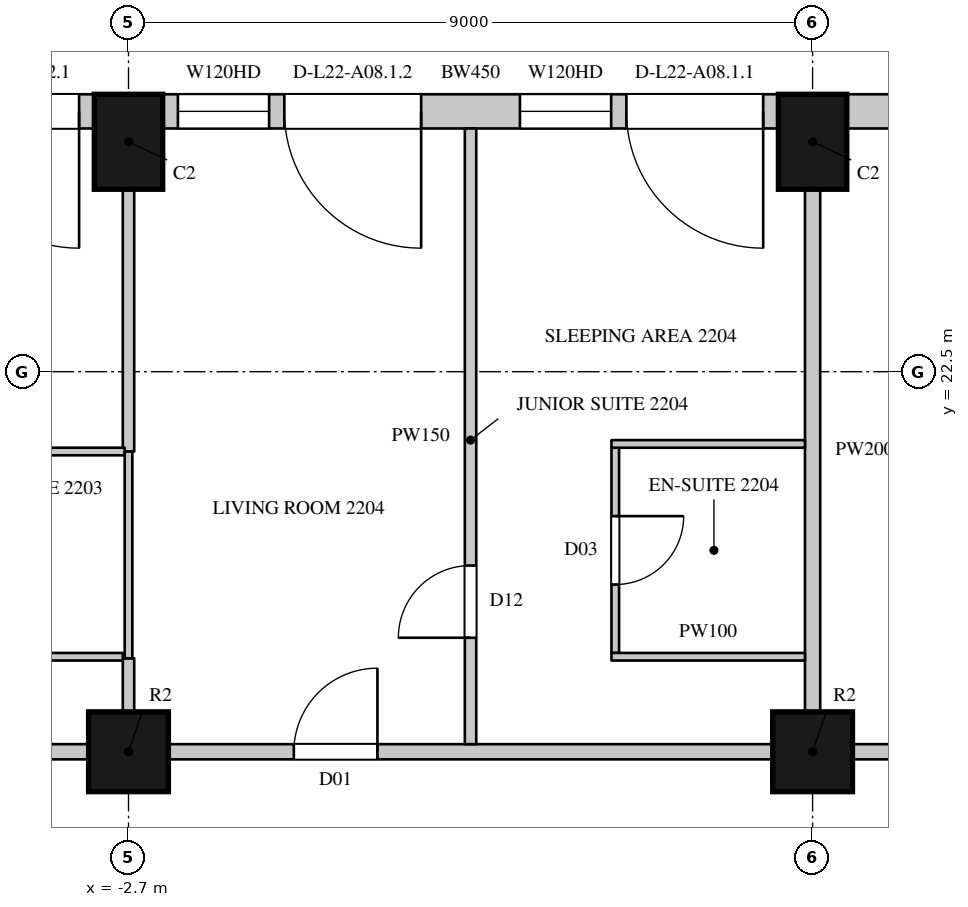
"""IFC4 building model, lengths in metres.
Left out: names, types, materials, properties, quantities, classifications, styles, units other than length and angle.
Written with IfcOpenShell. Run it as: python <this file> out.ifc"""

import sys

from ifc_helpers import new_model, si_unit, direction, frame, frame_2d, origin, origin_2d, place, context, subcontext, project, spatial, rectangle, circle, extrude, element, fill, save


model = new_model("IFC4")
c1 = context("Model", 3, precision=1e-05, world=origin(), true_north=direction((0.0, 1.0)))
c2 = subcontext(c1, "Body", "Model", "MODEL_VIEW")
j1 = project(units=[si_unit("LENGTHUNIT", "METRE"), si_unit("PLANEANGLEUNIT", "RADIAN")], contexts=[c1])
p1 = place(None, origin())
s1 = spatial("IfcSite", under=j1, at=p1, CompositionType="ELEMENT")
p2 = place(p1, origin())
s2 = spatial("IfcBuilding", under=s1, at=p2, CompositionType="ELEMENT")
p3 = place(p2, frame((0.0, 0.0, 109.5)))
s3 = spatial("IfcBuildingStorey", under=s2, at=p3, CompositionType="ELEMENT", Elevation=109.5)
for number, where, z_axis, x_axis in (
    (1, (6.3, 25.525, 0.0), (0.0, 0.0, 1.0), (-1.0, 0.0, 0.0)),
    (2, (-2.7, 25.525, 0.0), (0.0, 0.0, 1.0), (-1.0, 0.0, 0.0)),
):
    element("IfcColumn", number, at=place(p3, frame(where, z_axis=z_axis, x_axis=x_axis)), inside=s3, PredefinedType="COLUMN", context=c2, shape_type="SweptSolid", body=[
        extrude(rectangle(XDim=0.9, YDim=1.25, at=origin_2d()), origin(), (0.0, 0.0, 1.0), 3.6),
    ])
for number, where, z_axis, x_axis in (
    (3, (-2.7, 17.5, 0.0), (0.0, 0.0, 1.0), (1.0, 0.0, 0.0)),
    (4, (6.3, 17.5, 0.0), (0.0, 0.0, 1.0), (1.0, 0.0, 0.0)),
):
    element("IfcColumn", number, at=place(p3, frame(where, z_axis=z_axis, x_axis=x_axis)), inside=s3, PredefinedType="COLUMN", context=c2, shape_type="SweptSolid", body=[
        extrude(circle(Radius=0.525, at=origin_2d()), origin(), (0.0, 0.0, 1.0), 3.6),
    ])
p4 = place(p3, frame((11.989, 25.925, 0.0), z_axis=(0.0, 0.0, 1.0), x_axis=(-1.0, 0.0, 0.0)))
e5 = element("IfcWall", 5, at=p4, inside=s3, PredefinedType="SOLIDWALL", context=c2, shape_type="SweptSolid", body=[
    extrude(rectangle(XDim=5.239, YDim=0.45, at=frame_2d((2.619, 0.0))), origin(), (0.0, 0.0, 1.0), 3.3),
])
p5 = place(p4, frame((1.77, 0.0, 1.05)))
e6 = element("IfcOpeningElement", 6, at=p5, cuts=e5, PredefinedType="OPENING", context=c2, shape_type="SweptSolid", body=[
    extrude(rectangle(XDim=2.1, YDim=2.0, at=frame_2d((1.05, 1.0))), frame((0.0, 0.235, 0.0), z_axis=(0.0, -1.0, 0.0), x_axis=(1.0, 0.0, 0.0)), (0.0, 0.0, 1.0), 0.47),
])
p6 = place(p3, frame((5.85, 25.925, 0.0), z_axis=(0.0, 0.0, 1.0), x_axis=(-1.0, 0.0, 0.0)))
e7 = element("IfcWall", 7, at=p6, inside=s3, PredefinedType="SOLIDWALL", context=c2, shape_type="SweptSolid", body=[
    extrude(rectangle(XDim=8.1, YDim=0.45, at=frame_2d((4.05, 0.0))), origin(), (0.0, 0.0, 1.0), 3.3),
])
p7 = place(p6, frame((0.2, 0.0, 0.0)))
e8 = element("IfcOpeningElement", 8, at=p7, cuts=e7, PredefinedType="OPENING", context=c2, shape_type="SweptSolid", body=[
    extrude(rectangle(XDim=1.8, YDim=2.4, at=frame_2d((0.9, 1.2))), frame((0.0, 0.235, 0.0), z_axis=(0.0, -1.0, 0.0), x_axis=(1.0, 0.0, 0.0)), (0.0, 0.0, 1.0), 0.47),
])
p8 = place(p6, frame((2.2, 0.0, 1.05)))
e9 = element("IfcOpeningElement", 9, at=p8, cuts=e7, PredefinedType="OPENING", context=c2, shape_type="SweptSolid", body=[
    extrude(rectangle(XDim=1.2, YDim=2.0, at=frame_2d((0.6, 1.0))), frame((0.0, 0.235, 0.0), z_axis=(0.0, -1.0, 0.0), x_axis=(1.0, 0.0, 0.0)), (0.0, 0.0, 1.0), 0.47),
])
p9 = place(p6, frame((4.7, 0.0, 0.0)))
e10 = element("IfcOpeningElement", 10, at=p9, cuts=e7, PredefinedType="OPENING", context=c2, shape_type="SweptSolid", body=[
    extrude(rectangle(XDim=1.8, YDim=2.4, at=frame_2d((0.9, 1.2))), frame((0.0, 0.235, 0.0), z_axis=(0.0, -1.0, 0.0), x_axis=(1.0, 0.0, 0.0)), (0.0, 0.0, 1.0), 0.47),
])
p10 = place(p6, frame((6.7, 0.0, 1.05)))
e11 = element("IfcOpeningElement", 11, at=p10, cuts=e7, PredefinedType="OPENING", context=c2, shape_type="SweptSolid", body=[
    extrude(rectangle(XDim=1.2, YDim=2.0, at=frame_2d((0.6, 1.0))), frame((0.0, 0.235, 0.0), z_axis=(0.0, -1.0, 0.0), x_axis=(1.0, 0.0, 0.0)), (0.0, 0.0, 1.0), 0.47),
])
p11 = place(p3, frame((-3.15, 25.925, 0.0), z_axis=(0.0, 0.0, 1.0), x_axis=(-1.0, 0.0, 0.0)))
e12 = element("IfcWall", 12, at=p11, inside=s3, PredefinedType="SOLIDWALL", context=c2, shape_type="SweptSolid", body=[
    extrude(rectangle(XDim=8.1, YDim=0.45, at=frame_2d((4.05, 0.0))), origin(), (0.0, 0.0, 1.0), 3.3),
])
p12 = place(p11, frame((0.2, 0.0, 0.0)))
e13 = element("IfcOpeningElement", 13, at=p12, cuts=e12, PredefinedType="OPENING", context=c2, shape_type="SweptSolid", body=[
    extrude(rectangle(XDim=1.8, YDim=2.4, at=frame_2d((0.9, 1.2))), frame((0.0, 0.235, 0.0), z_axis=(0.0, -1.0, 0.0), x_axis=(1.0, 0.0, 0.0)), (0.0, 0.0, 1.0), 0.47),
])
p13 = place(p11, frame((2.2, 0.0, 1.05)))
e14 = element("IfcOpeningElement", 14, at=p13, cuts=e12, PredefinedType="OPENING", context=c2, shape_type="SweptSolid", body=[
    extrude(rectangle(XDim=1.2, YDim=2.0, at=frame_2d((0.6, 1.0))), frame((0.0, 0.235, 0.0), z_axis=(0.0, -1.0, 0.0), x_axis=(1.0, 0.0, 0.0)), (0.0, 0.0, 1.0), 0.47),
])
p14 = place(p11, frame((4.7, 0.0, 0.0)))
e15 = element("IfcOpeningElement", 15, at=p14, cuts=e12, PredefinedType="OPENING", context=c2, shape_type="SweptSolid", body=[
    extrude(rectangle(XDim=1.8, YDim=2.4, at=frame_2d((0.9, 1.2))), frame((0.0, 0.235, 0.0), z_axis=(0.0, -1.0, 0.0), x_axis=(1.0, 0.0, 0.0)), (0.0, 0.0, 1.0), 0.47),
])
p15 = place(p11, frame((6.7, 0.0, 1.05)))
e16 = element("IfcOpeningElement", 16, at=p15, cuts=e12, PredefinedType="OPENING", context=c2, shape_type="SweptSolid", body=[
    extrude(rectangle(XDim=1.2, YDim=2.0, at=frame_2d((0.6, 1.0))), frame((0.0, 0.235, 0.0), z_axis=(0.0, -1.0, 0.0), x_axis=(1.0, 0.0, 0.0)), (0.0, 0.0, 1.0), 0.47),
])
p16 = place(p3, frame((-11.175, 17.5, 0.0), z_axis=(0.0, 0.0, 1.0), x_axis=(1.0, 0.0, 0.0)))
e17 = element("IfcWall", 17, at=p16, inside=s3, PredefinedType="PARTITIONING", context=c2, shape_type="SweptSolid", body=[
    extrude(rectangle(XDim=7.95, YDim=0.2, at=frame_2d((3.975, 0.0))), origin(), (0.0, 0.0, 1.0), 2.75),
])
p17 = place(p16, frame((4.55, 0.0, 0.0)))
e18 = element("IfcOpeningElement", 18, at=p17, cuts=e17, PredefinedType="OPENING", context=c2, shape_type="SweptSolid", body=[
    extrude(rectangle(XDim=0.95, YDim=2.2, at=frame_2d((0.475, 1.1))), frame((0.0, 0.11, 0.0), z_axis=(0.0, -1.0, 0.0), x_axis=(1.0, 0.0, 0.0)), (0.0, 0.0, 1.0), 0.22),
])
p18 = place(p3, frame((-2.175, 17.5, 0.0), z_axis=(0.0, 0.0, 1.0), x_axis=(1.0, 0.0, 0.0)))
e19 = element("IfcWall", 19, at=p18, inside=s3, PredefinedType="PARTITIONING", context=c2, shape_type="SweptSolid", body=[
    extrude(rectangle(XDim=7.95, YDim=0.2, at=frame_2d((3.975, 0.0))), origin(), (0.0, 0.0, 1.0), 2.75),
])
p19 = place(p18, frame((1.65, 0.0, 0.0)))
e20 = element("IfcOpeningElement", 20, at=p19, cuts=e19, PredefinedType="OPENING", context=c2, shape_type="SweptSolid", body=[
    extrude(rectangle(XDim=1.1, YDim=2.4, at=frame_2d((0.55, 1.2))), frame((0.0, 0.11, 0.0), z_axis=(0.0, -1.0, 0.0), x_axis=(1.0, 0.0, 0.0)), (0.0, 0.0, 1.0), 0.22),
])
p20 = place(p3, frame((6.825, 17.5, 0.0), z_axis=(0.0, 0.0, 1.0), x_axis=(1.0, 0.0, 0.0)))
e21 = element("IfcWall", 21, at=p20, inside=s3, PredefinedType="PARTITIONING", context=c2, shape_type="SweptSolid", body=[
    extrude(rectangle(XDim=7.95, YDim=0.2, at=frame_2d((3.975, 0.0))), origin(), (0.0, 0.0, 1.0), 2.75),
])
p21 = place(p20, frame((1.55, 0.0, 0.0)))
e22 = element("IfcOpeningElement", 22, at=p21, cuts=e21, PredefinedType="OPENING", context=c2, shape_type="SweptSolid", body=[
    extrude(rectangle(XDim=1.1, YDim=2.4, at=frame_2d((0.55, 1.2))), frame((0.0, 0.11, 0.0), z_axis=(0.0, -1.0, 0.0), x_axis=(1.0, 0.0, 0.0)), (0.0, 0.0, 1.0), 0.22),
])
p22 = place(p3, frame((-2.7, 18.025, 0.0), z_axis=(0.0, 0.0, 1.0), x_axis=(0.0, 1.0, 0.0)))
e23 = element("IfcWall", 23, at=p22, inside=s3, PredefinedType="PARTITIONING", context=c2, shape_type="SweptSolid", body=[
    extrude(rectangle(XDim=0.705, YDim=0.15, at=frame_2d((0.353, 0.0))), origin(), (0.0, 0.0, 1.0), 2.75),
])
p23 = place(p3, frame((-2.7, 21.45, 0.0), z_axis=(0.0, 0.0, 1.0), x_axis=(0.0, 1.0, 0.0)))
e24 = element("IfcWall", 24, at=p23, inside=s3, PredefinedType="PARTITIONING", context=c2, shape_type="SweptSolid", body=[
    extrude(rectangle(XDim=3.45, YDim=0.15, at=frame_2d((1.725, 0.0))), origin(), (0.0, 0.0, 1.0), 2.75),
])
p24 = place(p3, frame((1.8, 17.6, 0.0), z_axis=(0.0, 0.0, 1.0), x_axis=(0.0, 1.0, 0.0)))
e25 = element("IfcWall", 25, at=p24, inside=s3, PredefinedType="PARTITIONING", context=c2, shape_type="SweptSolid", body=[
    extrude(rectangle(XDim=8.1, YDim=0.15, at=frame_2d((4.05, 0.0))), origin(), (0.0, 0.0, 1.0), 2.65),
])
p25 = place(p24, frame((1.4, 0.0, 0.0)))
e26 = element("IfcOpeningElement", 26, at=p25, cuts=e25, PredefinedType="OPENING", context=c2, shape_type="SweptSolid", body=[
    extrude(rectangle(XDim=0.95, YDim=2.2, at=frame_2d((0.475, 1.1))), frame((0.0, 0.085, 0.0), z_axis=(0.0, -1.0, 0.0), x_axis=(1.0, 0.0, 0.0)), (0.0, 0.0, 1.0), 0.17),
])
p26 = place(p3, frame((6.3, 18.025, 0.0), z_axis=(0.0, 0.0, 1.0), x_axis=(0.0, 1.0, 0.0)))
e27 = element("IfcWall", 27, at=p26, inside=s3, PredefinedType="PARTITIONING", context=c2, shape_type="SweptSolid", body=[
    extrude(rectangle(XDim=6.875, YDim=0.2, at=frame_2d((3.438, 0.0))), origin(), (0.0, 0.0, 1.0), 2.75),
])
p27 = place(p3, frame((-5.146, 18.75, 0.0), z_axis=(0.0, 0.0, 1.0), x_axis=(1.0, 0.0, 0.0)))
e28 = element("IfcWall", 28, at=p27, inside=s3, PredefinedType="PARTITIONING", context=c2, shape_type="SweptSolid", body=[
    extrude(rectangle(XDim=2.371, YDim=0.1, at=frame_2d((1.186, 0.0))), origin(), (0.0, 0.0, 1.0), 3.3),
])
p28 = place(p3, frame((-5.146, 21.45, 0.0), z_axis=(0.0, 0.0, 1.0), x_axis=(1.0, 0.0, 0.0)))
e29 = element("IfcWall", 29, at=p28, inside=s3, PredefinedType="PARTITIONING", context=c2, shape_type="SweptSolid", body=[
    extrude(rectangle(XDim=2.396, YDim=0.1, at=frame_2d((1.198, 0.0))), origin(), (0.0, 0.0, 1.0), 3.3),
])
p29 = place(p3, frame((-2.7, 18.73, 0.0), z_axis=(0.0, 0.0, 1.0), x_axis=(0.0, 1.0, 0.0)))
e30 = element("IfcWall", 30, at=p29, inside=s3, PredefinedType="PARTITIONING", context=c2, shape_type="SweptSolid", body=[
    extrude(rectangle(XDim=2.72, YDim=0.1, at=frame_2d((1.36, 0.0))), origin(), (0.0, 0.0, 1.0), 2.75),
])
p30 = place(p3, frame((3.704, 18.8, 0.0), z_axis=(0.0, 0.0, 1.0), x_axis=(0.0, 1.0, 0.0)))
e31 = element("IfcWall", 31, at=p30, inside=s3, PredefinedType="PARTITIONING", context=c2, shape_type="SweptSolid", body=[
    extrude(rectangle(XDim=2.7, YDim=0.1, at=frame_2d((1.35, 0.0))), origin(), (0.0, 0.0, 1.0), 3.3),
])
p31 = place(p30, frame((0.9, 0.0, 0.0)))
e32 = element("IfcOpeningElement", 32, at=p31, cuts=e31, PredefinedType="OPENING", context=c2, shape_type="SweptSolid", body=[
    extrude(rectangle(XDim=0.9, YDim=2.2, at=frame_2d((0.45, 1.1))), frame((0.0, 0.06, 0.0), z_axis=(0.0, -1.0, 0.0), x_axis=(1.0, 0.0, 0.0)), (0.0, 0.0, 1.0), 0.12),
])
for number, where, z_axis, x_axis in (
    (33, (3.654, 18.75, 0.0), (0.0, 0.0, 1.0), (1.0, 0.0, 0.0)),
    (34, (3.654, 21.55, 0.0), (0.0, 0.0, 1.0), (1.0, 0.0, 0.0)),
):
    element("IfcWall", number, at=place(p3, frame(where, z_axis=z_axis, x_axis=x_axis)), inside=s3, PredefinedType="PARTITIONING", context=c2, shape_type="SweptSolid", body=[
        extrude(rectangle(XDim=2.546, YDim=0.1, at=frame_2d((1.273, 0.0))), origin(), (0.0, 0.0, 1.0), 3.3),
    ])
p32 = place(p7, origin())
e35 = element("IfcDoor", 35, at=p32, inside=s3, OperationType="SLIDING_TO_LEFT", PredefinedType="DOOR", context=c2, shape_type="SweptSolid", body=[
    extrude(rectangle(XDim=1.8, YDim=2.4, at=frame_2d((0.9, 1.2))), frame((0.0, 0.13, 0.0), z_axis=(0.0, -1.0, 0.0), x_axis=(1.0, 0.0, 0.0)), (0.0, 0.0, 1.0), 0.05),
])
fill(e8, e35)
p33 = place(p8, origin())
e36 = element("IfcWindow", 36, at=p33, inside=s3, PartitioningType="SINGLE_PANEL", PredefinedType="WINDOW", context=c2, shape_type="SweptSolid", body=[
    extrude(rectangle(XDim=1.2, YDim=2.0, at=frame_2d((0.6, 1.0))), frame((0.0, 0.135, 0.0), z_axis=(0.0, -1.0, 0.0), x_axis=(1.0, 0.0, 0.0)), (0.0, 0.0, 1.0), 0.06),
])
fill(e9, e36)
p34 = place(p9, origin())
e37 = element("IfcDoor", 37, at=p34, inside=s3, OperationType="SLIDING_TO_LEFT", PredefinedType="DOOR", context=c2, shape_type="SweptSolid", body=[
    extrude(rectangle(XDim=1.8, YDim=2.4, at=frame_2d((0.9, 1.2))), frame((0.0, 0.13, 0.0), z_axis=(0.0, -1.0, 0.0), x_axis=(1.0, 0.0, 0.0)), (0.0, 0.0, 1.0), 0.05),
])
fill(e10, e37)
p35 = place(p10, origin())
e38 = element("IfcWindow", 38, at=p35, inside=s3, PartitioningType="SINGLE_PANEL", PredefinedType="WINDOW", context=c2, shape_type="SweptSolid", body=[
    extrude(rectangle(XDim=1.2, YDim=2.0, at=frame_2d((0.6, 1.0))), frame((0.0, 0.135, 0.0), z_axis=(0.0, -1.0, 0.0), x_axis=(1.0, 0.0, 0.0)), (0.0, 0.0, 1.0), 0.06),
])
fill(e11, e38)
p36 = place(p12, origin())
e39 = element("IfcDoor", 39, at=p36, inside=s3, OperationType="SLIDING_TO_LEFT", PredefinedType="DOOR", context=c2, shape_type="SweptSolid", body=[
    extrude(rectangle(XDim=1.8, YDim=2.4, at=frame_2d((0.9, 1.2))), frame((0.0, 0.13, 0.0), z_axis=(0.0, -1.0, 0.0), x_axis=(1.0, 0.0, 0.0)), (0.0, 0.0, 1.0), 0.05),
])
fill(e13, e39)
p37 = place(p19, origin())
e40 = element("IfcDoor", 40, at=p37, inside=s3, OperationType="SINGLE_SWING_RIGHT", PredefinedType="DOOR", context=c2, shape_type="SweptSolid", body=[
    extrude(rectangle(XDim=1.1, YDim=2.4, at=frame_2d((0.55, 1.2))), frame((0.0, 0.025, 0.0), z_axis=(0.0, -1.0, 0.0), x_axis=(1.0, 0.0, 0.0)), (0.0, 0.0, 1.0), 0.05),
])
fill(e20, e40)
p38 = place(p25, origin())
e41 = element("IfcDoor", 41, at=p38, inside=s3, OperationType="SINGLE_SWING_LEFT", PredefinedType="DOOR", context=c2, shape_type="SweptSolid", body=[
    extrude(rectangle(XDim=0.95, YDim=2.2, at=frame_2d((0.475, 1.1))), frame((0.0, 0.025, 0.0), z_axis=(0.0, -1.0, 0.0), x_axis=(1.0, 0.0, 0.0)), (0.0, 0.0, 1.0), 0.05),
])
fill(e26, e41)
p39 = place(p31, origin())
e42 = element("IfcDoor", 42, at=p39, inside=s3, OperationType="SINGLE_SWING_LEFT", PredefinedType="DOOR", context=c2, shape_type="SweptSolid", body=[
    extrude(rectangle(XDim=0.9, YDim=2.2, at=frame_2d((0.45, 1.1))), frame((0.0, 0.025, 0.0), z_axis=(0.0, -1.0, 0.0), x_axis=(1.0, 0.0, 0.0)), (0.0, 0.0, 1.0), 0.05),
])
fill(e32, e42)
save(model, sys.argv[1])
